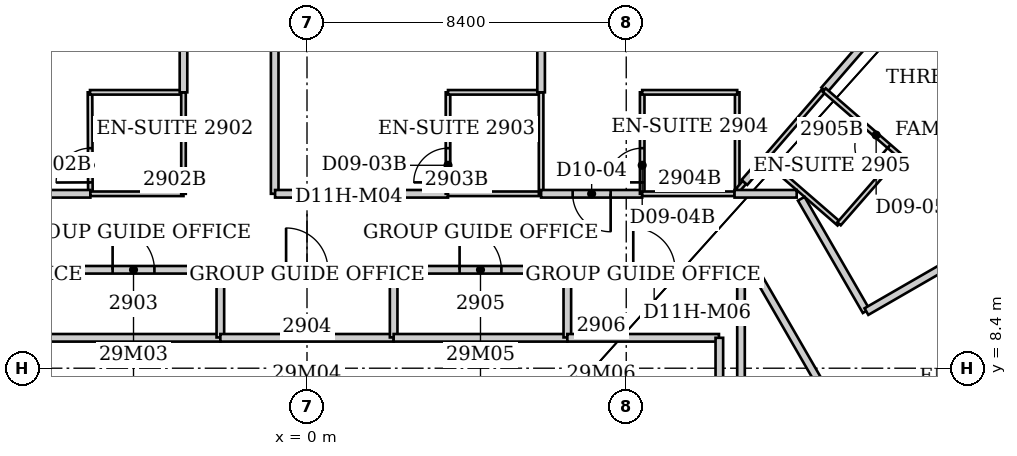
"""IFC4 building model, lengths in metres.
Left out: names, types, materials, properties, quantities, classifications, styles, units other than length and angle.
Written with IfcOpenShell. Run it as: python <this file> out.ifc"""

import sys

from ifc_helpers import new_model, si_unit, direction, frame, frame_2d, origin, place, context, subcontext, project, spatial, rectangle, extrude, element, fill, save


model = new_model("IFC4")
c1 = context("Model", 3, precision=1e-05, world=origin(), true_north=direction((0.0, 1.0)))
c2 = subcontext(c1, "Body", "Model", "MODEL_VIEW")
j1 = project(units=[si_unit("LENGTHUNIT", "METRE"), si_unit("PLANEANGLEUNIT", "RADIAN")], contexts=[c1])
p1 = place(None, origin())
s1 = spatial("IfcSite", under=j1, at=p1, CompositionType="ELEMENT")
p2 = place(p1, origin())
s2 = spatial("IfcBuilding", under=s1, at=p2, CompositionType="ELEMENT")
p3 = place(p2, frame((0.0, 0.0, 119.6)))
s3 = spatial("IfcBuildingStorey", under=s2, at=p3, CompositionType="ELEMENT", Elevation=119.6)
p4 = place(p3, frame((-6.85, 10.99, 0.0), z_axis=(0.0, 0.0, 1.0), x_axis=(1.0, 0.0, 0.0)))
e1 = element("IfcWall", 1, at=p4, inside=s3, PredefinedType="PARTITIONING", context=c2, shape_type="SweptSolid", body=[
    extrude(rectangle(XDim=4.57, YDim=0.2, at=frame_2d((2.285, 0.0))), origin(), (0.0, 0.0, 1.0), 3.64),
])
p5 = place(p4, frame((1.735, 0.0, 0.0)))
e2 = element("IfcOpeningElement", 2, at=p5, cuts=e1, PredefinedType="OPENING", context=c2, shape_type="SweptSolid", body=[
    extrude(rectangle(XDim=1.1, YDim=2.2, at=frame_2d((0.55, 1.1))), frame((0.0, 0.1, 0.0), z_axis=(0.0, -1.0, 0.0), x_axis=(1.0, 0.0, 0.0)), (0.0, 0.0, 1.0), 0.2),
])
p6 = place(p3, frame((-5.71, 15.66, 0.0), z_axis=(0.0, 0.0, 1.0), x_axis=(0.003749059241, -0.999992972253, 0.0)))
e3 = element("IfcWall", 3, at=p6, inside=s3, PredefinedType="PARTITIONING", context=c2, shape_type="SweptSolid", body=[
    extrude(rectangle(XDim=2.67, YDim=0.12, at=frame_2d((1.335, 0.0))), origin(), (0.0, 0.0, 1.0), 3.64),
])
p7 = place(p6, frame((1.47, 0.0, 0.0)))
e4 = element("IfcOpeningElement", 4, at=p7, cuts=e3, PredefinedType="OPENING", context=c2, shape_type="SweptSolid", body=[
    extrude(rectangle(XDim=0.9, YDim=2.03, at=frame_2d((0.45, 1.015))), frame((0.0, 0.06, 0.0), z_axis=(0.0, -1.0, 0.0), x_axis=(1.0, 0.0, 0.0)), (0.0, 0.0, 1.0), 0.12),
])
p8 = place(p3, frame((-5.7, 12.99, 0.0), z_axis=(0.0, 0.0, 1.0), x_axis=(-1.0, 0.0, 0.0)))
e5 = element("IfcWall", 5, at=p8, inside=s3, PredefinedType="PARTITIONING", context=c2, shape_type="SweptSolid", body=[
    extrude(rectangle(XDim=3.92, YDim=0.2, at=frame_2d((1.96, 0.0))), origin(), (0.0, 0.0, 1.0), 3.64),
])
p9 = place(p3, frame((-3.25, 12.99, 0.0), z_axis=(0.0, 0.0, 1.0), x_axis=(-1.0, 0.0, 0.0)))
e6 = element("IfcWall", 6, at=p9, inside=s3, PredefinedType="PARTITIONING", context=c2, shape_type="SweptSolid", body=[
    extrude(rectangle(XDim=2.45, YDim=0.12, at=frame_2d((1.225, 0.0))), origin(), (0.0, 0.0, 1.0), 3.64),
])
p10 = place(p3, frame((-3.25, 15.66, 0.0), z_axis=(0.0, 0.0, 1.0), x_axis=(-1.0, 0.0, 0.0)))
e7 = element("IfcWall", 7, at=p10, inside=s3, PredefinedType="PARTITIONING", context=c2, shape_type="SweptSolid", body=[
    extrude(rectangle(XDim=2.46, YDim=0.12, at=frame_2d((1.23, 0.0))), origin(), (0.0, 0.0, 1.0), 3.64),
])
p11 = place(p3, frame((-3.25, 15.66, 0.0), z_axis=(0.0, 0.0, 1.0), x_axis=(0.0, -1.0, 0.0)))
e8 = element("IfcWall", 8, at=p11, inside=s3, PredefinedType="PARTITIONING", context=c2, shape_type="SweptSolid", body=[
    extrude(rectangle(XDim=2.67, YDim=0.12, at=frame_2d((1.335, 0.0))), origin(), (0.0, 0.0, 1.0), 3.64),
])
p12 = place(p3, frame((-3.25, 22.46, 0.0), z_axis=(0.0, 0.0, 1.0), x_axis=(0.0, -1.0, 0.0)))
e9 = element("IfcWall", 9, at=p12, inside=s3, PredefinedType="PARTITIONING", context=c2, shape_type="SweptSolid", body=[
    extrude(rectangle(XDim=6.8, YDim=0.2, at=frame_2d((3.4, 0.0))), origin(), (0.0, 0.0, 1.0), 3.64),
])
p13 = place(p12, frame((2.9, 0.0, 0.0)))
e10 = element("IfcOpeningElement", 10, at=p13, cuts=e9, PredefinedType="OPENING", context=c2, shape_type="SweptSolid", body=[
    extrude(rectangle(XDim=1.0, YDim=2.13, at=frame_2d((0.5, 1.065))), frame((0.0, 0.1, 0.0), z_axis=(0.0, -1.0, 0.0), x_axis=(1.0, 0.0, 0.0)), (0.0, 0.0, 1.0), 0.2),
])
p14 = place(p3, frame((-2.28, 9.2, 0.0), z_axis=(0.0, 0.0, 1.0), x_axis=(-1.0, 0.0, 0.0)))
e11 = element("IfcWall", 11, at=p14, inside=s3, PredefinedType="PARTITIONING", context=c2, shape_type="SweptSolid", body=[
    extrude(rectangle(XDim=4.57, YDim=0.2, at=frame_2d((2.285, 0.0))), origin(), (0.0, 0.0, 1.0), 3.64),
])
p15 = place(p3, frame((-2.28, 10.98, 0.0), z_axis=(0.0, 0.0, 1.0), x_axis=(0.0, -1.0, 0.0)))
e12 = element("IfcWall", 12, at=p15, inside=s3, PredefinedType="PARTITIONING", context=c2, shape_type="SweptSolid", body=[
    extrude(rectangle(XDim=1.77, YDim=0.2, at=frame_2d((0.885, 0.0))), origin(), (0.0, 0.0, 1.0), 3.64),
])
p16 = place(p3, frame((-2.28, 10.99, 0.0), z_axis=(0.0, 0.0, 1.0), x_axis=(1.0, 0.0, 0.0)))
e13 = element("IfcWall", 13, at=p16, inside=s3, PredefinedType="PARTITIONING", context=c2, shape_type="SweptSolid", body=[
    extrude(rectangle(XDim=4.56, YDim=0.2, at=frame_2d((2.28, 0.0))), origin(), (0.0, 0.0, 1.0), 3.64),
])
p17 = place(p16, frame((1.73, 0.0, 0.0)))
e14 = element("IfcOpeningElement", 14, at=p17, cuts=e13, PredefinedType="OPENING", context=c2, shape_type="SweptSolid", body=[
    extrude(rectangle(XDim=1.1, YDim=2.2, at=frame_2d((0.55, 1.1))), frame((0.0, 0.1, 0.0), z_axis=(0.0, -1.0, 0.0), x_axis=(1.0, 0.0, 0.0)), (0.0, 0.0, 1.0), 0.2),
])
p18 = place(p3, frame((-0.85, 12.99, 0.0), z_axis=(0.0, 0.0, 1.0), x_axis=(0.0, 1.0, 0.0)))
e15 = element("IfcWall", 15, at=p18, inside=s3, PredefinedType="PARTITIONING", context=c2, shape_type="SweptSolid", body=[
    extrude(rectangle(XDim=9.47, YDim=0.2, at=frame_2d((4.735, 0.0))), origin(), (0.0, 0.0, 1.0), 3.64),
])
p19 = place(p18, frame((4.235, 0.0, 0.0)))
e16 = element("IfcOpeningElement", 16, at=p19, cuts=e15, PredefinedType="OPENING", context=c2, shape_type="SweptSolid", body=[
    extrude(rectangle(XDim=1.0, YDim=2.13, at=frame_2d((0.5, 1.065))), frame((0.0, 0.1, 0.0), z_axis=(0.0, -1.0, 0.0), x_axis=(1.0, 0.0, 0.0)), (0.0, 0.0, 1.0), 0.2),
])
p20 = place(p3, frame((2.28, 9.2, 0.0), z_axis=(0.0, 0.0, 1.0), x_axis=(-1.0, 0.0, 0.0)))
e17 = element("IfcWall", 17, at=p20, inside=s3, PredefinedType="PARTITIONING", context=c2, shape_type="SweptSolid", body=[
    extrude(rectangle(XDim=4.56, YDim=0.2, at=frame_2d((2.28, 0.0))), origin(), (0.0, 0.0, 1.0), 3.64),
])
p21 = place(p3, frame((2.28, 10.98, 0.0), z_axis=(0.0, 0.0, 1.0), x_axis=(0.0, -1.0, 0.0)))
e18 = element("IfcWall", 18, at=p21, inside=s3, PredefinedType="PARTITIONING", context=c2, shape_type="SweptSolid", body=[
    extrude(rectangle(XDim=1.77, YDim=0.2, at=frame_2d((0.885, 0.0))), origin(), (0.0, 0.0, 1.0), 3.64),
])
p22 = place(p3, frame((2.28, 10.99, 0.0), z_axis=(0.0, 0.0, 1.0), x_axis=(1.0, 0.0, 0.0)))
e19 = element("IfcWall", 19, at=p22, inside=s3, PredefinedType="PARTITIONING", context=c2, shape_type="SweptSolid", body=[
    extrude(rectangle(XDim=4.57, YDim=0.2, at=frame_2d((2.285, 0.0))), origin(), (0.0, 0.0, 1.0), 3.64),
])
p23 = place(p22, frame((1.735, 0.0, 0.0)))
e20 = element("IfcOpeningElement", 20, at=p23, cuts=e19, PredefinedType="OPENING", context=c2, shape_type="SweptSolid", body=[
    extrude(rectangle(XDim=1.1, YDim=2.2, at=frame_2d((0.55, 1.1))), frame((0.0, 0.1, 0.0), z_axis=(0.0, -1.0, 0.0), x_axis=(1.0, 0.0, 0.0)), (0.0, 0.0, 1.0), 0.2),
])
p24 = place(p3, frame((3.71, 12.99, 0.0), z_axis=(0.0, 0.0, 1.0), x_axis=(-1.0, 0.0, 0.0)))
e21 = element("IfcWall", 21, at=p24, inside=s3, PredefinedType="PARTITIONING", context=c2, shape_type="SweptSolid", body=[
    extrude(rectangle(XDim=4.55, YDim=0.2, at=frame_2d((2.275, 0.0))), origin(), (0.0, 0.0, 1.0), 3.64),
])
p25 = place(p3, frame((3.71, 15.66, 0.0), z_axis=(0.0, 0.0, 1.0), x_axis=(0.0, -1.0, 0.0)))
e22 = element("IfcWall", 22, at=p25, inside=s3, PredefinedType="PARTITIONING", context=c2, shape_type="SweptSolid", body=[
    extrude(rectangle(XDim=2.67, YDim=0.12, at=frame_2d((1.335, 0.0))), origin(), (0.0, 0.0, 1.0), 3.64),
])
p26 = place(p25, frame((1.47, 0.0, 0.0)))
e23 = element("IfcOpeningElement", 23, at=p26, cuts=e22, PredefinedType="OPENING", context=c2, shape_type="SweptSolid", body=[
    extrude(rectangle(XDim=0.9, YDim=2.03, at=frame_2d((0.45, 1.015))), frame((0.0, 0.06, 0.0), z_axis=(0.0, -1.0, 0.0), x_axis=(1.0, 0.0, 0.0)), (0.0, 0.0, 1.0), 0.12),
])
for number, where, z_axis, x_axis in (
    (24, (6.16, 12.99, 0.0), (0.0, 0.0, 1.0), (-1.0, 0.0, 0.0)),
    (25, (6.16, 15.66, 0.0), (0.0, 0.0, 1.0), (-1.0, 0.0, 0.0)),
):
    element("IfcWall", number, at=place(p3, frame(where, z_axis=z_axis, x_axis=x_axis)), inside=s3, PredefinedType="PARTITIONING", context=c2, shape_type="SweptSolid", body=[
        extrude(rectangle(XDim=2.45, YDim=0.12, at=frame_2d((1.225, 0.0))), origin(), (0.0, 0.0, 1.0), 3.64),
    ])
p27 = place(p3, frame((6.16, 15.66, 0.0), z_axis=(0.0, 0.0, 1.0), x_axis=(0.0, -1.0, 0.0)))
e26 = element("IfcWall", 26, at=p27, inside=s3, PredefinedType="PARTITIONING", context=c2, shape_type="SweptSolid", body=[
    extrude(rectangle(XDim=2.67, YDim=0.12, at=frame_2d((1.335, 0.0))), origin(), (0.0, 0.0, 1.0), 3.64),
])
p28 = place(p3, frame((6.16, 22.37, 0.0), z_axis=(0.0, 0.0, 1.0), x_axis=(0.0, -1.0, 0.0)))
e27 = element("IfcWall", 27, at=p28, inside=s3, PredefinedType="PARTITIONING", context=c2, shape_type="SweptSolid", body=[
    extrude(rectangle(XDim=6.71, YDim=0.2, at=frame_2d((3.355, 0.0))), origin(), (0.0, 0.0, 1.0), 3.64),
])
p29 = place(p3, frame((6.85, 9.2, 0.0), z_axis=(0.0, 0.0, 1.0), x_axis=(-1.0, 0.0, 0.0)))
e28 = element("IfcWall", 28, at=p29, inside=s3, PredefinedType="PARTITIONING", context=c2, shape_type="SweptSolid", body=[
    extrude(rectangle(XDim=4.57, YDim=0.2, at=frame_2d((2.285, 0.0))), origin(), (0.0, 0.0, 1.0), 3.64),
])
p30 = place(p3, frame((6.85, 10.98, 0.0), z_axis=(0.0, 0.0, 1.0), x_axis=(0.0, -1.0, 0.0)))
e29 = element("IfcWall", 29, at=p30, inside=s3, PredefinedType="PARTITIONING", context=c2, shape_type="SweptSolid", body=[
    extrude(rectangle(XDim=1.77, YDim=0.2, at=frame_2d((0.885, 0.0))), origin(), (0.0, 0.0, 1.0), 3.64),
])
p31 = place(p3, frame((6.85, 10.99, 0.0), z_axis=(0.0, 0.0, 1.0), x_axis=(1.0, 0.0, 0.0)))
e30 = element("IfcWall", 30, at=p31, inside=s3, PredefinedType="PARTITIONING", context=c2, shape_type="SweptSolid", body=[
    extrude(rectangle(XDim=4.57, YDim=0.2, at=frame_2d((2.285, 0.0))), origin(), (0.0, 0.0, 1.0), 3.64),
])
p32 = place(p31, frame((1.735, 0.0, 0.0)))
e31 = element("IfcOpeningElement", 31, at=p32, cuts=e30, PredefinedType="OPENING", context=c2, shape_type="SweptSolid", body=[
    extrude(rectangle(XDim=1.1, YDim=2.2, at=frame_2d((0.55, 1.1))), frame((0.0, 0.1, 0.0), z_axis=(0.0, -1.0, 0.0), x_axis=(1.0, 0.0, 0.0)), (0.0, 0.0, 1.0), 0.2),
])
p33 = place(p3, frame((8.82, 12.99, 0.0), z_axis=(0.0, 0.0, 1.0), x_axis=(-1.0, 0.0, 0.0)))
e32 = element("IfcWall", 32, at=p33, inside=s3, PredefinedType="PARTITIONING", context=c2, shape_type="SweptSolid", body=[
    extrude(rectangle(XDim=2.66, YDim=0.2, at=frame_2d((1.33, 0.0))), origin(), (0.0, 0.0, 1.0), 3.64),
])
p34 = place(p33, frame((0.83, 0.0, 0.0)))
e33 = element("IfcOpeningElement", 33, at=p34, cuts=e32, PredefinedType="OPENING", context=c2, shape_type="SweptSolid", body=[
    extrude(rectangle(XDim=1.0, YDim=2.13, at=frame_2d((0.5, 1.065))), frame((0.0, 0.1, 0.0), z_axis=(0.0, -1.0, 0.0), x_axis=(1.0, 0.0, 0.0)), (0.0, 0.0, 1.0), 0.2),
])
p35 = place(p3, frame((8.82, 15.66, 0.0), z_axis=(0.0, 0.0, 1.0), x_axis=(0.0, -1.0, 0.0)))
e34 = element("IfcWall", 34, at=p35, inside=s3, PredefinedType="PARTITIONING", context=c2, shape_type="SweptSolid", body=[
    extrude(rectangle(XDim=2.67, YDim=0.12, at=frame_2d((1.335, 0.0))), origin(), (0.0, 0.0, 1.0), 3.64),
])
p36 = place(p35, frame((1.47, 0.0, 0.0)))
e35 = element("IfcOpeningElement", 35, at=p36, cuts=e34, PredefinedType="OPENING", context=c2, shape_type="SweptSolid", body=[
    extrude(rectangle(XDim=0.9, YDim=2.03, at=frame_2d((0.45, 1.015))), frame((0.0, 0.06, 0.0), z_axis=(0.0, -1.0, 0.0), x_axis=(1.0, 0.0, 0.0)), (0.0, 0.0, 1.0), 0.12),
])
p37 = place(p3, frame((10.84, 9.2, 0.0), z_axis=(0.0, 0.0, 1.0), x_axis=(-1.0, 0.0, 0.0)))
e36 = element("IfcWall", 36, at=p37, inside=s3, PredefinedType="PARTITIONING", context=c2, shape_type="SweptSolid", body=[
    extrude(rectangle(XDim=3.99, YDim=0.2, at=frame_2d((1.995, 0.0))), origin(), (0.0, 0.0, 1.0), 3.64),
])
p38 = place(p3, frame((10.85, -5.19, 0.0), z_axis=(0.0, 0.0, 1.0), x_axis=(0.0, 1.0, 0.0)))
e37 = element("IfcWall", 37, at=p38, inside=s3, PredefinedType="PARTITIONING", context=c2, shape_type="SweptSolid", body=[
    extrude(rectangle(XDim=14.39, YDim=0.2, at=frame_2d((7.195, 0.0))), origin(), (0.0, 0.0, 1.0), 3.64),
])
p39 = place(p3, frame((11.25, 12.99, 0.0), z_axis=(0.0, 0.0, 1.0), x_axis=(-1.0, 0.0, 0.0)))
e38 = element("IfcWall", 38, at=p39, inside=s3, PredefinedType="PARTITIONING", context=c2, shape_type="SweptSolid", body=[
    extrude(rectangle(XDim=2.43, YDim=0.12, at=frame_2d((1.215, 0.0))), origin(), (0.0, 0.0, 1.0), 3.64),
])
p40 = place(p3, frame((11.32, 13.07, 0.0), z_axis=(0.0, 0.0, 1.0), x_axis=(0.0, 1.0, 0.0)))
e39 = element("IfcWall", 39, at=p40, inside=s3, PredefinedType="PARTITIONING", context=c2, shape_type="SweptSolid", body=[
    extrude(rectangle(XDim=2.59, YDim=0.12, at=frame_2d((1.295, 0.0))), origin(), (0.0, 0.0, 1.0), 3.64),
])
p41 = place(p3, frame((11.32, 15.66, 0.0), z_axis=(0.0, 0.0, 1.0), x_axis=(-1.0, 0.0, 0.0)))
e40 = element("IfcWall", 40, at=p41, inside=s3, PredefinedType="PARTITIONING", context=c2, shape_type="SweptSolid", body=[
    extrude(rectangle(XDim=2.5, YDim=0.12, at=frame_2d((1.25, 0.0))), origin(), (0.0, 0.0, 1.0), 3.64),
])
p42 = place(p3, frame((11.336, 13.089, 0.0), z_axis=(0.0, 0.0, 1.0), x_axis=(0.65328489719, 0.757112173396, 0.0)))
e41 = element("IfcWall", 41, at=p42, inside=s3, PredefinedType="PARTITIONING", context=c2, shape_type="SweptSolid", body=[
    extrude(rectangle(XDim=0.266, YDim=0.12, at=frame_2d((0.133, 0.0))), origin(), (0.0, 0.0, 1.0), 3.64),
])
p43 = place(p3, frame((11.42, 10.98, 0.0), z_axis=(0.0, 0.0, 1.0), x_axis=(0.0, -1.0, 0.0)))
e42 = element("IfcWall", 42, at=p43, inside=s3, PredefinedType="PARTITIONING", context=c2, shape_type="SweptSolid", body=[
    extrude(rectangle(XDim=14.985, YDim=0.2, at=frame_2d((7.492, 0.0))), origin(), (0.0, 0.0, 1.0), 3.64),
])
p44 = place(p3, frame((11.42, 10.99, 0.0), z_axis=(0.0, 0.0, 1.0), x_axis=(1.0, 0.0, 0.0)))
e43 = element("IfcWall", 43, at=p44, inside=s3, PredefinedType="PARTITIONING", context=c2, shape_type="SweptSolid", body=[
    extrude(rectangle(XDim=0.35, YDim=0.2, at=frame_2d((0.175, 0.0))), origin(), (0.0, 0.0, 1.0), 3.64),
])
p45 = place(p3, frame((11.51, 13.29, 0.0), z_axis=(0.0, 0.0, 1.0), x_axis=(0.655976713225, 0.754781128345, 0.0)))
e44 = element("IfcWall", 44, at=p45, inside=s3, PredefinedType="PARTITIONING", context=c2, shape_type="SweptSolid", body=[
    extrude(rectangle(XDim=0.808, YDim=0.2, at=frame_2d((0.404, 0.0))), origin(), (0.0, 0.0, 1.0), 3.64),
])
p46 = place(p3, frame((11.77, 10.99, 0.0), z_axis=(0.0, 0.0, 1.0), x_axis=(0.500093981358, -0.865971136822, 0.0)))
e45 = element("IfcWall", 45, at=p46, inside=s3, PredefinedType="PARTITIONING", context=c2, shape_type="SweptSolid", body=[
    extrude(rectangle(XDim=8.418, YDim=0.2, at=frame_2d((4.209, 0.0))), origin(), (0.0, 0.0, 1.0), 3.64),
])
p47 = place(p3, frame((12.039, 13.901, 0.0), z_axis=(0.0, 0.0, 1.0), x_axis=(0.653622514847, 0.756820723874, 0.0)))
e46 = element("IfcWall", 46, at=p47, inside=s3, PredefinedType="PARTITIONING", context=c2, shape_type="SweptSolid", body=[
    extrude(rectangle(XDim=2.404, YDim=0.12, at=frame_2d((1.202, 0.0))), origin(), (0.0, 0.0, 1.0), 3.64),
])
p48 = place(p3, frame((12.04, 13.9, 0.0), z_axis=(0.0, 0.0, 1.0), x_axis=(0.755437535555, -0.655220672655, 0.0)))
e47 = element("IfcWall", 47, at=p48, inside=s3, PredefinedType="PARTITIONING", context=c2, shape_type="SweptSolid", body=[
    extrude(rectangle(XDim=2.594, YDim=0.12, at=frame_2d((1.297, 0.0))), origin(), (0.0, 0.0, 1.0), 3.64),
])
p49 = place(p3, frame((12.885, 12.99, 0.0), z_axis=(0.0, 0.0, 1.0), x_axis=(-1.0, 0.0, 0.0)))
e48 = element("IfcWall", 48, at=p49, inside=s3, PredefinedType="PARTITIONING", context=c2, shape_type="SweptSolid", body=[
    extrude(rectangle(XDim=1.635, YDim=0.2, at=frame_2d((0.817, 0.0))), origin(), (0.0, 0.0, 1.0), 3.64),
])
p50 = place(p3, frame((13.005, 12.86, 0.0), z_axis=(0.0, 0.0, 1.0), x_axis=(0.500007161152, -0.866021269252, 0.0)))
e49 = element("IfcWall", 49, at=p50, inside=s3, PredefinedType="PARTITIONING", context=c2, shape_type="SweptSolid", body=[
    extrude(rectangle(XDim=3.415, YDim=0.2, at=frame_2d((1.707, 0.0))), origin(), (0.0, 0.0, 1.0), 3.64),
])
p51 = place(p3, frame((13.61, 15.72, 0.0), z_axis=(0.0, 0.0, 1.0), x_axis=(0.654752892245, 0.75584300625, 0.0)))
e50 = element("IfcWall", 50, at=p51, inside=s3, PredefinedType="PARTITIONING", context=c2, shape_type="SweptSolid", body=[
    extrude(rectangle(XDim=8.477, YDim=0.2, at=frame_2d((4.238, 0.0))), origin(), (0.0, 0.0, 1.0), 3.64),
])
p52 = place(p3, frame((14.0, 12.2, 0.0), z_axis=(0.0, 0.0, 1.0), x_axis=(0.657626528627, 0.753344110514, 0.0)))
e51 = element("IfcWall", 51, at=p52, inside=s3, PredefinedType="PARTITIONING", context=c2, shape_type="SweptSolid", body=[
    extrude(rectangle(XDim=2.403, YDim=0.12, at=frame_2d((1.201, 0.0))), origin(), (0.0, 0.0, 1.0), 3.64),
])
p53 = place(p3, frame((15.58, 14.01, 0.0), z_axis=(0.0, 0.0, 1.0), x_axis=(-0.755185511235, 0.655511131576, 0.0)))
e52 = element("IfcWall", 52, at=p53, inside=s3, PredefinedType="PARTITIONING", context=c2, shape_type="SweptSolid", body=[
    extrude(rectangle(XDim=2.609, YDim=0.12, at=frame_2d((1.304, 0.0))), origin(), (0.0, 0.0, 1.0), 3.64),
])
p54 = place(p53, frame((0.35, 0.0, 0.0)))
e53 = element("IfcOpeningElement", 53, at=p54, cuts=e52, PredefinedType="OPENING", context=c2, shape_type="SweptSolid", body=[
    extrude(rectangle(XDim=0.9, YDim=2.03, at=frame_2d((0.45, 1.015))), frame((0.0, 0.06, 0.0), z_axis=(0.0, -1.0, 0.0), x_axis=(1.0, 0.0, 0.0)), (0.0, 0.0, 1.0), 0.12),
])
p55 = place(p3, frame((15.933, 7.817, 0.0), z_axis=(0.0, 0.0, 1.0), x_axis=(0.870733094426, 0.491755913305, 0.0)))
e54 = element("IfcWall", 54, at=p55, inside=s3, PredefinedType="PARTITIONING", context=c2, shape_type="SweptSolid", body=[
    extrude(rectangle(XDim=0.961, YDim=0.2, at=frame_2d((0.48, 0.0))), origin(), (0.0, 0.0, 1.0), 3.64),
])
p56 = place(p3, frame((23.794, 15.125, 0.0), z_axis=(0.0, 0.0, 1.0), x_axis=(-0.866190629897, -0.499713710718, 0.0)))
e55 = element("IfcWall", 55, at=p56, inside=s3, PredefinedType="PARTITIONING", context=c2, shape_type="SweptSolid", body=[
    extrude(rectangle(XDim=10.476, YDim=0.2, at=frame_2d((5.238, 0.0))), origin(), (0.0, 0.0, 1.0), 3.64),
])
p57 = place(p56, frame((4.738, 0.0, 0.0)))
e56 = element("IfcOpeningElement", 56, at=p57, cuts=e55, PredefinedType="OPENING", context=c2, shape_type="SweptSolid", body=[
    extrude(rectangle(XDim=1.0, YDim=2.13, at=frame_2d((0.5, 1.065))), frame((0.0, 0.1, 0.0), z_axis=(0.0, -1.0, 0.0), x_axis=(1.0, 0.0, 0.0)), (0.0, 0.0, 1.0), 0.2),
])
p58 = place(p7, origin())
e57 = element("IfcDoor", 57, at=p58, inside=s3, OperationType="SINGLE_SWING_RIGHT", PredefinedType="DOOR", context=c2, shape_type="SweptSolid", body=[
    extrude(rectangle(XDim=0.9, YDim=2.03, at=frame_2d((0.45, 1.015))), frame((0.0, 0.025, 0.0), z_axis=(0.0, -1.0, 0.0), x_axis=(1.0, 0.0, 0.0)), (0.0, 0.0, 1.0), 0.05),
])
fill(e4, e57)
p59 = place(p26, origin())
e58 = element("IfcDoor", 58, at=p59, inside=s3, OperationType="SINGLE_SWING_RIGHT", PredefinedType="DOOR", context=c2, shape_type="SweptSolid", body=[
    extrude(rectangle(XDim=0.9, YDim=2.03, at=frame_2d((0.45, 1.015))), frame((0.0, 0.025, 0.0), z_axis=(0.0, -1.0, 0.0), x_axis=(1.0, 0.0, 0.0)), (0.0, 0.0, 1.0), 0.05),
])
fill(e23, e58)
p60 = place(p34, origin())
e59 = element("IfcDoor", 59, at=p60, inside=s3, OperationType="SINGLE_SWING_LEFT", PredefinedType="DOOR", context=c2, shape_type="SweptSolid", body=[
    extrude(rectangle(XDim=1.0, YDim=2.13, at=frame_2d((0.5, 1.065))), frame((0.0, 0.025, 0.0), z_axis=(0.0, -1.0, 0.0), x_axis=(1.0, 0.0, 0.0)), (0.0, 0.0, 1.0), 0.05),
])
fill(e33, e59)
p61 = place(p36, origin())
e60 = element("IfcDoor", 60, at=p61, inside=s3, OperationType="SINGLE_SWING_RIGHT", PredefinedType="DOOR", context=c2, shape_type="SweptSolid", body=[
    extrude(rectangle(XDim=0.9, YDim=2.03, at=frame_2d((0.45, 1.015))), frame((0.0, 0.025, 0.0), z_axis=(0.0, -1.0, 0.0), x_axis=(1.0, 0.0, 0.0)), (0.0, 0.0, 1.0), 0.05),
])
fill(e35, e60)
p62 = place(p54, origin())
e61 = element("IfcDoor", 61, at=p62, inside=s3, OperationType="SINGLE_SWING_LEFT", PredefinedType="DOOR", context=c2, shape_type="SweptSolid", body=[
    extrude(rectangle(XDim=0.9, YDim=2.03, at=frame_2d((0.45, 1.015))), frame((0.0, 0.025, 0.0), z_axis=(0.0, -1.0, 0.0), x_axis=(1.0, 0.0, 0.0)), (0.0, 0.0, 1.0), 0.05),
])
fill(e53, e61)
p63 = place(p5, origin())
e62 = element("IfcDoor", 62, at=p63, inside=s3, OperationType="SINGLE_SWING_LEFT", PredefinedType="DOOR", context=c2, shape_type="SweptSolid", body=[
    extrude(rectangle(XDim=1.1, YDim=2.2, at=frame_2d((0.55, 1.1))), frame((0.0, 0.025, 0.0), z_axis=(0.0, -1.0, 0.0), x_axis=(1.0, 0.0, 0.0)), (0.0, 0.0, 1.0), 0.05),
])
fill(e2, e62)
p64 = place(p17, origin())
e63 = element("IfcDoor", 63, at=p64, inside=s3, OperationType="SINGLE_SWING_LEFT", PredefinedType="DOOR", context=c2, shape_type="SweptSolid", body=[
    extrude(rectangle(XDim=1.1, YDim=2.2, at=frame_2d((0.55, 1.1))), frame((0.0, 0.025, 0.0), z_axis=(0.0, -1.0, 0.0), x_axis=(1.0, 0.0, 0.0)), (0.0, 0.0, 1.0), 0.05),
])
fill(e14, e63)
p65 = place(p23, origin())
e64 = element("IfcDoor", 64, at=p65, inside=s3, OperationType="SINGLE_SWING_LEFT", PredefinedType="DOOR", context=c2, shape_type="SweptSolid", body=[
    extrude(rectangle(XDim=1.1, YDim=2.2, at=frame_2d((0.55, 1.1))), frame((0.0, 0.025, 0.0), z_axis=(0.0, -1.0, 0.0), x_axis=(1.0, 0.0, 0.0)), (0.0, 0.0, 1.0), 0.05),
])
fill(e20, e64)
p66 = place(p32, origin())
e65 = element("IfcDoor", 65, at=p66, inside=s3, OperationType="SINGLE_SWING_LEFT", PredefinedType="DOOR", context=c2, shape_type="SweptSolid", body=[
    extrude(rectangle(XDim=1.1, YDim=2.2, at=frame_2d((0.55, 1.1))), frame((0.0, 0.025, 0.0), z_axis=(0.0, -1.0, 0.0), x_axis=(1.0, 0.0, 0.0)), (0.0, 0.0, 1.0), 0.05),
])
fill(e31, e65)
save(model, sys.argv[1])
